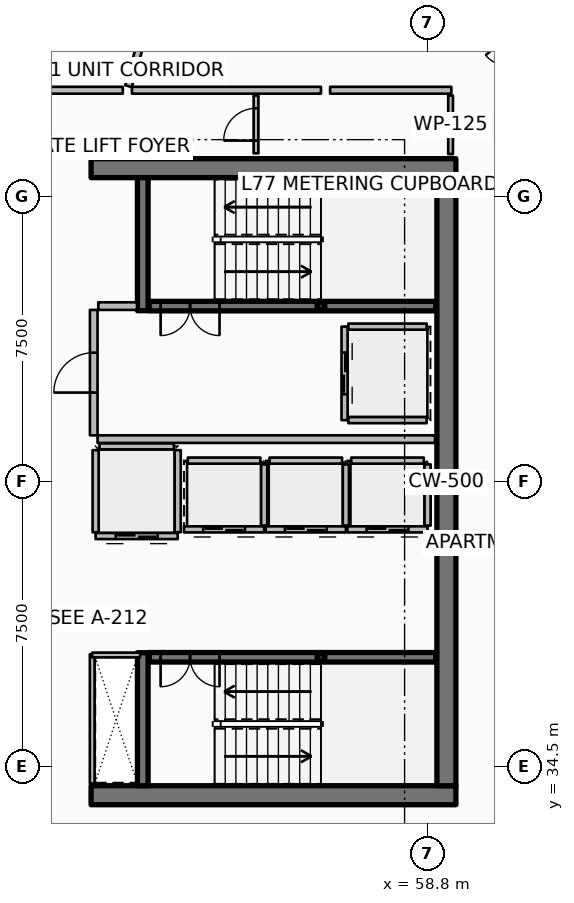
"""IFC4 building model, lengths in metres.
Left out: names, types, materials, properties, quantities, classifications, styles, units other than length and angle.
Written with IfcOpenShell. Run it as: python <this file> out.ifc"""

import sys

from ifc_helpers import new_model, si_unit, direction, frame, frame_2d, origin, origin_2d, place, context, subcontext, project, spatial, rectangle, hollow_rectangle, extrude, element, fill, save


model = new_model("IFC4")
c1 = context("Model", 3, precision=1e-05, world=origin(), true_north=direction((0.0, 1.0)))
c2 = subcontext(c1, "Body", "Model", "MODEL_VIEW")
j1 = project(units=[si_unit("LENGTHUNIT", "METRE"), si_unit("PLANEANGLEUNIT", "RADIAN")], contexts=[c1])
p1 = place(None, origin())
s1 = spatial("IfcSite", under=j1, at=p1, CompositionType="ELEMENT")
p2 = place(p1, origin())
s2 = spatial("IfcBuilding", under=s1, at=p2, CompositionType="ELEMENT")
p3 = place(p2, frame((0.0, 0.0, 306.0)))
s3 = spatial("IfcBuildingStorey", under=s2, at=p3, CompositionType="ELEMENT", Elevation=306.0)
for number, where, z_axis, x_axis in (
    (1, (49.95, 33.75, 0.0), (0.0, 0.0, 1.0), (1.0, 0.0, 0.0)),
    (2, (49.95, 50.25, 0.0), (0.0, 0.0, 1.0), (1.0, 0.0, 0.0)),
):
    element("IfcWall", number, at=place(p3, frame(where, z_axis=z_axis, x_axis=x_axis)), inside=s3, PredefinedType="SHEAR", context=c2, shape_type="SweptSolid", body=[
        extrude(rectangle(XDim=9.6, YDim=0.5, at=frame_2d((4.8, 0.0))), origin(), (0.0, 0.0, 1.0), 3.85),
    ])
p4 = place(p3, frame((59.3, 34.0, 0.0), z_axis=(0.0, 0.0, 1.0), x_axis=(0.0, 1.0, 0.0)))
e3 = element("IfcWall", 3, at=p4, inside=s3, PredefinedType="SHEAR", context=c2, shape_type="SweptSolid", body=[
    extrude(rectangle(XDim=16.0, YDim=0.5, at=frame_2d((8.0, 0.0))), origin(), (0.0, 0.0, 1.0), 3.85),
])
for number, where, z_axis, x_axis in (
    (4, (51.31, 46.5, 0.0), (0.0, 0.0, 1.0), (0.0, 1.0, 0.0)),
    (5, (51.31, 34.0, 0.0), (0.0, 0.0, 1.0), (0.0, 1.0, 0.0)),
):
    element("IfcWall", number, at=place(p3, frame(where, z_axis=z_axis, x_axis=x_axis)), inside=s3, PredefinedType="SHEAR", context=c2, shape_type="SweptSolid", body=[
        extrude(rectangle(XDim=3.5, YDim=0.28, at=frame_2d((1.75, 0.0))), origin(), (0.0, 0.0, 1.0), 3.85),
    ])
for number, where, z_axis, x_axis in (
    (6, (56.0, 46.62, 0.0), (0.0, 0.0, 1.0), (1.0, 0.0, 0.0)),
    (7, (56.0, 37.38, 0.0), (0.0, 0.0, 1.0), (1.0, 0.0, 0.0)),
):
    element("IfcColumn", number, at=place(p3, frame(where, z_axis=z_axis, x_axis=x_axis)), inside=s3, PredefinedType="COLUMN", context=c2, shape_type="SweptSolid", body=[
        extrude(hollow_rectangle(XDim=0.2, YDim=0.2, WallThickness=0.01, InnerFilletRadius=0.01, OuterFilletRadius=0.02, at=origin_2d()), origin(), (0.0, 0.0, 1.0), 1.72),
    ])
p5 = place(p3, frame((51.48, 46.62, 0.0), z_axis=(0.0, 0.0, 1.0), x_axis=(1.0, 0.0, 0.0)))
e8 = element("IfcWall", 8, at=p5, inside=s3, PredefinedType="SOLIDWALL", context=c2, shape_type="SweptSolid", body=[
    extrude(rectangle(XDim=7.54, YDim=0.25, at=frame_2d((3.77, 0.0))), origin(), (0.0, 0.0, 1.0), 3.45),
])
p6 = place(p5, frame((0.3, 0.0, 0.0)))
e9 = element("IfcOpeningElement", 9, at=p6, cuts=e8, PredefinedType="OPENING", context=c2, shape_type="SweptSolid", body=[
    extrude(rectangle(XDim=1.55, YDim=2.15, at=frame_2d((0.775, 1.075))), frame((0.0, 0.135, 0.0), z_axis=(0.0, -1.0, 0.0), x_axis=(1.0, 0.0, 0.0)), (0.0, 0.0, 1.0), 0.27),
])
p7 = place(p3, frame((51.48, 37.38, 0.0), z_axis=(0.0, 0.0, 1.0), x_axis=(1.0, 0.0, 0.0)))
e10 = element("IfcWall", 10, at=p7, inside=s3, PredefinedType="SOLIDWALL", context=c2, shape_type="SweptSolid", body=[
    extrude(rectangle(XDim=7.54, YDim=0.25, at=frame_2d((3.77, 0.0))), origin(), (0.0, 0.0, 1.0), 3.45),
])
p8 = place(p7, frame((0.3, 0.0, 0.0)))
e11 = element("IfcOpeningElement", 11, at=p8, cuts=e10, PredefinedType="OPENING", context=c2, shape_type="SweptSolid", body=[
    extrude(rectangle(XDim=1.55, YDim=2.15, at=frame_2d((0.775, 1.075))), frame((0.0, 0.135, 0.0), z_axis=(0.0, -1.0, 0.0), x_axis=(1.0, 0.0, 0.0)), (0.0, 0.0, 1.0), 0.27),
])
p9 = place(p3, frame((54.505, 40.745, 0.0), z_axis=(0.0, 0.0, 1.0), x_axis=(-1.0, 0.0, 0.0)))
e12 = element("IfcWall", 12, at=p9, inside=s3, PredefinedType="PARTITIONING", context=c2, shape_type="SweptSolid", body=[
    extrude(rectangle(XDim=2.11, YDim=0.16, at=frame_2d((1.055, 0.0))), origin(), (0.0, 0.0, 1.0), 3.45),
])
p10 = place(p9, frame((0.505, 0.0, 0.0)))
e13 = element("IfcOpeningElement", 13, at=p10, cuts=e12, PredefinedType="OPENING", context=c2, shape_type="SweptSolid", body=[
    extrude(rectangle(XDim=1.1, YDim=2.1, at=frame_2d((0.55, 1.05))), frame((0.0, 0.09, 0.0), z_axis=(0.0, -1.0, 0.0), x_axis=(1.0, 0.0, 0.0)), (0.0, 0.0, 1.0), 0.18),
])
p11 = place(p3, frame((54.505, 40.845, 0.0), z_axis=(0.0, 0.0, 1.0), x_axis=(0.0, 1.0, 0.0)))
e14 = element("IfcWall", 14, at=p11, inside=s3, PredefinedType="PARTITIONING", context=c2, shape_type="SweptSolid", body=[
    extrude(rectangle(XDim=1.61, YDim=0.16, at=frame_2d((0.805, 0.0))), origin(), (0.0, 0.0, 1.0), 3.45),
])
p12 = place(p3, frame((52.495, 42.555, 0.0), z_axis=(0.0, 0.0, 1.0), x_axis=(1.0, 0.0, 0.0)))
e15 = element("IfcWall", 15, at=p12, inside=s3, PredefinedType="PARTITIONING", context=c2, shape_type="SweptSolid", body=[
    extrude(rectangle(XDim=1.91, YDim=0.16, at=frame_2d((0.955, 0.0))), origin(), (0.0, 0.0, 1.0), 3.45),
])
p13 = place(p3, frame((56.655, 40.745, 0.0), z_axis=(0.0, 0.0, 1.0), x_axis=(-1.0, 0.0, 0.0)))
e16 = element("IfcWall", 16, at=p13, inside=s3, PredefinedType="PARTITIONING", context=c2, shape_type="SweptSolid", body=[
    extrude(rectangle(XDim=2.11, YDim=0.16, at=frame_2d((1.055, 0.0))), origin(), (0.0, 0.0, 1.0), 3.45),
])
p14 = place(p13, frame((0.505, 0.0, 0.0)))
e17 = element("IfcOpeningElement", 17, at=p14, cuts=e16, PredefinedType="OPENING", context=c2, shape_type="SweptSolid", body=[
    extrude(rectangle(XDim=1.1, YDim=2.1, at=frame_2d((0.55, 1.05))), frame((0.0, 0.09, 0.0), z_axis=(0.0, -1.0, 0.0), x_axis=(1.0, 0.0, 0.0)), (0.0, 0.0, 1.0), 0.18),
])
p15 = place(p3, frame((56.655, 40.845, 0.0), z_axis=(0.0, 0.0, 1.0), x_axis=(0.0, 1.0, 0.0)))
e18 = element("IfcWall", 18, at=p15, inside=s3, PredefinedType="PARTITIONING", context=c2, shape_type="SweptSolid", body=[
    extrude(rectangle(XDim=1.61, YDim=0.16, at=frame_2d((0.805, 0.0))), origin(), (0.0, 0.0, 1.0), 3.45),
])
p16 = place(p3, frame((54.645, 42.555, 0.0), z_axis=(0.0, 0.0, 1.0), x_axis=(1.0, 0.0, 0.0)))
e19 = element("IfcWall", 19, at=p16, inside=s3, PredefinedType="PARTITIONING", context=c2, shape_type="SweptSolid", body=[
    extrude(rectangle(XDim=1.91, YDim=0.16, at=frame_2d((0.955, 0.0))), origin(), (0.0, 0.0, 1.0), 3.45),
])
p17 = place(p3, frame((58.805, 40.745, 0.0), z_axis=(0.0, 0.0, 1.0), x_axis=(-1.0, 0.0, 0.0)))
e20 = element("IfcWall", 20, at=p17, inside=s3, PredefinedType="PARTITIONING", context=c2, shape_type="SweptSolid", body=[
    extrude(rectangle(XDim=2.11, YDim=0.16, at=frame_2d((1.055, 0.0))), origin(), (0.0, 0.0, 1.0), 3.45),
])
p18 = place(p17, frame((0.505, 0.0, 0.0)))
e21 = element("IfcOpeningElement", 21, at=p18, cuts=e20, PredefinedType="OPENING", context=c2, shape_type="SweptSolid", body=[
    extrude(rectangle(XDim=1.1, YDim=2.1, at=frame_2d((0.55, 1.05))), frame((0.0, 0.09, 0.0), z_axis=(0.0, -1.0, 0.0), x_axis=(1.0, 0.0, 0.0)), (0.0, 0.0, 1.0), 0.18),
])
p19 = place(p3, frame((58.805, 40.845, 0.0), z_axis=(0.0, 0.0, 1.0), x_axis=(0.0, 1.0, 0.0)))
e22 = element("IfcWall", 22, at=p19, inside=s3, PredefinedType="PARTITIONING", context=c2, shape_type="SweptSolid", body=[
    extrude(rectangle(XDim=1.61, YDim=0.16, at=frame_2d((0.805, 0.0))), origin(), (0.0, 0.0, 1.0), 3.45),
])
p20 = place(p3, frame((56.795, 42.555, 0.0), z_axis=(0.0, 0.0, 1.0), x_axis=(1.0, 0.0, 0.0)))
e23 = element("IfcWall", 23, at=p20, inside=s3, PredefinedType="PARTITIONING", context=c2, shape_type="SweptSolid", body=[
    extrude(rectangle(XDim=1.91, YDim=0.16, at=frame_2d((0.955, 0.0))), origin(), (0.0, 0.0, 1.0), 3.45),
])
p21 = place(p3, frame((56.62, 46.08, 0.0), z_axis=(0.0, 0.0, 1.0), x_axis=(0.0, -1.0, 0.0)))
e24 = element("IfcWall", 24, at=p21, inside=s3, PredefinedType="PARTITIONING", context=c2, shape_type="SweptSolid", body=[
    extrude(rectangle(XDim=2.46, YDim=0.16, at=frame_2d((1.23, 0.0))), origin(), (0.0, 0.0, 1.0), 3.45),
])
p22 = place(p21, frame((0.68, 0.0, 0.0)))
e25 = element("IfcOpeningElement", 25, at=p22, cuts=e24, PredefinedType="OPENING", context=c2, shape_type="SweptSolid", body=[
    extrude(rectangle(XDim=1.1, YDim=2.1, at=frame_2d((0.55, 1.05))), frame((0.0, 0.09, 0.0), z_axis=(0.0, -1.0, 0.0), x_axis=(1.0, 0.0, 0.0)), (0.0, 0.0, 1.0), 0.18),
])
for number, where, z_axis, x_axis in (
    (26, (56.72, 46.08, 0.0), (0.0, 0.0, 1.0), (1.0, 0.0, 0.0)),
    (27, (56.72, 43.62, 0.0), (0.0, 0.0, 1.0), (1.0, 0.0, 0.0)),
):
    element("IfcWall", number, at=place(p3, frame(where, z_axis=z_axis, x_axis=x_axis)), inside=s3, PredefinedType="PARTITIONING", context=c2, shape_type="SweptSolid", body=[
        extrude(rectangle(XDim=2.06, YDim=0.16, at=frame_2d((1.03, 0.0))), origin(), (0.0, 0.0, 1.0), 3.45),
    ])
p23 = place(p3, frame((52.23, 40.57, 0.0), z_axis=(0.0, 0.0, 1.0), x_axis=(-1.0, 0.0, 0.0)))
e28 = element("IfcWall", 28, at=p23, inside=s3, PredefinedType="PARTITIONING", context=c2, shape_type="SweptSolid", body=[
    extrude(rectangle(XDim=2.16, YDim=0.16, at=frame_2d((1.08, 0.0))), origin(), (0.0, 0.0, 1.0), 3.45),
])
p24 = place(p23, frame((0.53, 0.0, 0.0)))
e29 = element("IfcOpeningElement", 29, at=p24, cuts=e28, PredefinedType="OPENING", context=c2, shape_type="SweptSolid", body=[
    extrude(rectangle(XDim=1.1, YDim=2.1, at=frame_2d((0.55, 1.05))), frame((0.0, 0.09, 0.0), z_axis=(0.0, -1.0, 0.0), x_axis=(1.0, 0.0, 0.0)), (0.0, 0.0, 1.0), 0.18),
])
for number, where, z_axis, x_axis in (
    (30, (52.23, 40.67, 0.0), (0.0, 0.0, 1.0), (0.0, 1.0, 0.0)),
    (31, (50.07, 40.67, 0.0), (0.0, 0.0, 1.0), (0.0, 1.0, 0.0)),
):
    element("IfcWall", number, at=place(p3, frame(where, z_axis=z_axis, x_axis=x_axis)), inside=s3, PredefinedType="PARTITIONING", context=c2, shape_type="SweptSolid", body=[
        extrude(rectangle(XDim=2.16, YDim=0.16, at=frame_2d((1.08, 0.0))), origin(), (0.0, 0.0, 1.0), 3.45),
    ])
p25 = place(p3, frame((50.17, 42.93, 0.0), z_axis=(0.0, 0.0, 1.0), x_axis=(1.0, 0.0, 0.0)))
e32 = element("IfcWall", 32, at=p25, inside=s3, PredefinedType="PARTITIONING", context=c2, shape_type="SweptSolid", body=[
    extrude(rectangle(XDim=1.96, YDim=0.16, at=frame_2d((0.98, 0.0))), origin(), (0.0, 0.0, 1.0), 3.45),
])
p26 = place(p3, frame((50.12, 43.12, 0.0), z_axis=(0.0, 0.0, 1.0), x_axis=(1.0, 0.0, 0.0)))
e33 = element("IfcWall", 33, at=p26, inside=s3, PredefinedType="PARTITIONING", context=c2, shape_type="SweptSolid", body=[
    extrude(rectangle(XDim=8.88, YDim=0.2, at=frame_2d((4.44, 0.0))), origin(), (0.0, 0.0, 1.0), 3.45),
])
p27 = place(p3, frame((50.14, 46.62, 0.0), z_axis=(0.0, 0.0, 1.0), x_axis=(1.0, 0.0, 0.0)))
e34 = element("IfcWall", 34, at=p27, inside=s3, PredefinedType="PARTITIONING", context=c2, shape_type="SweptSolid", body=[
    extrude(rectangle(XDim=1.02, YDim=0.2, at=frame_2d((0.51, 0.0))), origin(), (0.0, 0.0, 1.0), 3.45),
])
p28 = place(p3, frame((50.02, 43.22, 0.0), z_axis=(0.0, 0.0, 1.0), x_axis=(0.0, 1.0, 0.0)))
e35 = element("IfcWall", 35, at=p28, inside=s3, PredefinedType="PARTITIONING", context=c2, shape_type="SweptSolid", body=[
    extrude(rectangle(XDim=3.3, YDim=0.2, at=frame_2d((1.65, 0.0))), origin(), (0.0, 0.0, 1.0), 3.45),
])
p29 = place(p28, frame((1.125, 0.0, 0.0)))
e36 = element("IfcOpeningElement", 36, at=p29, cuts=e35, PredefinedType="OPENING", context=c2, shape_type="SweptSolid", body=[
    extrude(rectangle(XDim=1.05, YDim=2.1, at=frame_2d((0.525, 1.05))), frame((0.0, 0.11, 0.0), z_axis=(0.0, -1.0, 0.0), x_axis=(1.0, 0.0, 0.0)), (0.0, 0.0, 1.0), 0.22),
])
p30 = place(p3, frame((49.98, 34.06, 0.0), z_axis=(0.0, 0.0, 1.0), x_axis=(0.0, 1.0, 0.0)))
e37 = element("IfcWall", 37, at=p30, inside=s3, PredefinedType="PARTITIONING", context=c2, shape_type="SweptSolid", body=[
    extrude(rectangle(XDim=3.4, YDim=0.125, at=frame_2d((1.7, 0.0))), origin(), (0.0, 0.0, 1.0), 2.89),
])
p31 = place(p3, frame((49.98, 37.44, 0.0), z_axis=(0.0, 0.0, 1.0), x_axis=(1.0, 0.0, 0.0)))
e38 = element("IfcWall", 38, at=p31, inside=s3, PredefinedType="PARTITIONING", context=c2, shape_type="SweptSolid", body=[
    extrude(rectangle(XDim=1.26, YDim=0.125, at=frame_2d((0.63, 0.0))), origin(), (0.0, 0.0, 1.0), 2.89),
])
p32 = place(p3, frame((59.41, 50.62, 0.0), z_axis=(0.0, 0.0, 1.0), x_axis=(0.0, 1.0, 0.0)))
e39 = element("IfcWall", 39, at=p32, inside=s3, PredefinedType="PARTITIONING", context=c2, shape_type="SweptSolid", body=[
    extrude(rectangle(XDim=1.54, YDim=0.125, at=frame_2d((0.77, 0.0))), origin(), (0.0, 0.0, 1.0), 2.89),
])
p33 = place(p3, frame((54.29, 50.64, 0.0), z_axis=(0.0, 0.0, 1.0), x_axis=(0.0, 1.0, 0.0)))
e40 = element("IfcWall", 40, at=p33, inside=s3, PredefinedType="PARTITIONING", context=c2, shape_type="SweptSolid", body=[
    extrude(rectangle(XDim=1.52, YDim=0.125, at=frame_2d((0.76, 0.0))), origin(), (0.0, 0.0, 1.0), 2.89),
])
p34 = place(p33, frame((0.335, 0.0, 0.0)))
e41 = element("IfcOpeningElement", 41, at=p34, cuts=e40, PredefinedType="OPENING", context=c2, shape_type="SweptSolid", body=[
    extrude(rectangle(XDim=0.85, YDim=2.06, at=frame_2d((0.425, 1.03))), frame((0.0, 0.073, 0.0), z_axis=(0.0, -1.0, 0.0), x_axis=(1.0, 0.0, 0.0)), (0.0, 0.0, 1.0), 0.145),
])
p35 = place(p3, frame((50.935, 52.406, 0.0), z_axis=(0.0, 0.0, 1.0), x_axis=(0.27143720787, 0.962456150785, 0.0)))
e42 = element("IfcWall", 42, at=p35, inside=s3, PredefinedType="PARTITIONING", context=c2, shape_type="SweptSolid", body=[
    extrude(rectangle(XDim=14.903, YDim=0.18, at=frame_2d((7.451, 0.0))), origin(), (0.0, 0.0, 1.0), 2.407),
])
p36 = place(p3, frame((50.785, 52.3, 0.0), z_axis=(0.0, 0.0, 1.0), x_axis=(-1.0, 0.0, 0.0)))
e43 = element("IfcWall", 43, at=p36, inside=s3, PredefinedType="PARTITIONING", context=c2, shape_type="SweptSolid", body=[
    extrude(rectangle(XDim=3.884, YDim=0.18, at=frame_2d((1.942, 0.0))), origin(), (0.0, 0.0, 1.0), 2.407),
])
p37 = place(p3, frame((59.43, 52.3, 0.0), z_axis=(0.0, 0.0, 1.0), x_axis=(-1.0, 0.0, 0.0)))
e44 = element("IfcWall", 44, at=p37, inside=s3, PredefinedType="PARTITIONING", context=c2, shape_type="SweptSolid", body=[
    extrude(rectangle(XDim=3.19, YDim=0.18, at=frame_2d((1.595, 0.0))), origin(), (0.0, 0.0, 1.0), 2.407),
])
p38 = place(p3, frame((56.0, 52.3, 0.0), z_axis=(0.0, 0.0, 1.0), x_axis=(-1.0, 0.0, 0.0)))
e45 = element("IfcWall", 45, at=p38, inside=s3, PredefinedType="PARTITIONING", context=c2, shape_type="SweptSolid", body=[
    extrude(rectangle(XDim=4.975, YDim=0.18, at=frame_2d((2.488, 0.0))), origin(), (0.0, 0.0, 1.0), 2.407),
])
p39 = place(p6, origin())
e46 = element("IfcDoor", 46, at=p39, inside=s3, OperationType="DOUBLE_DOOR_SINGLE_SWING", PredefinedType="DOOR", context=c2, shape_type="SweptSolid", body=[
    extrude(rectangle(XDim=1.55, YDim=2.15, at=frame_2d((0.775, 1.075))), frame((0.0, 0.025, 0.0), z_axis=(0.0, -1.0, 0.0), x_axis=(1.0, 0.0, 0.0)), (0.0, 0.0, 1.0), 0.05),
])
fill(e9, e46)
p40 = place(p8, origin())
e47 = element("IfcDoor", 47, at=p40, inside=s3, OperationType="DOUBLE_DOOR_SINGLE_SWING", PredefinedType="DOOR", context=c2, shape_type="SweptSolid", body=[
    extrude(rectangle(XDim=1.55, YDim=2.15, at=frame_2d((0.775, 1.075))), frame((0.0, 0.025, 0.0), z_axis=(0.0, -1.0, 0.0), x_axis=(1.0, 0.0, 0.0)), (0.0, 0.0, 1.0), 0.05),
])
fill(e11, e47)
p41 = place(p10, origin())
e48 = element("IfcDoor", 48, at=p41, inside=s3, OperationType="DOUBLE_DOOR_SLIDING", PredefinedType="DOOR", context=c2, shape_type="SweptSolid", body=[
    extrude(rectangle(XDim=1.1, YDim=2.1, at=frame_2d((0.55, 1.05))), frame((0.0, 0.025, 0.0), z_axis=(0.0, -1.0, 0.0), x_axis=(1.0, 0.0, 0.0)), (0.0, 0.0, 1.0), 0.05),
])
fill(e13, e48)
p42 = place(p14, origin())
e49 = element("IfcDoor", 49, at=p42, inside=s3, OperationType="DOUBLE_DOOR_SLIDING", PredefinedType="DOOR", context=c2, shape_type="SweptSolid", body=[
    extrude(rectangle(XDim=1.1, YDim=2.1, at=frame_2d((0.55, 1.05))), frame((0.0, 0.025, 0.0), z_axis=(0.0, -1.0, 0.0), x_axis=(1.0, 0.0, 0.0)), (0.0, 0.0, 1.0), 0.05),
])
fill(e17, e49)
p43 = place(p18, origin())
e50 = element("IfcDoor", 50, at=p43, inside=s3, OperationType="DOUBLE_DOOR_SLIDING", PredefinedType="DOOR", context=c2, shape_type="SweptSolid", body=[
    extrude(rectangle(XDim=1.1, YDim=2.1, at=frame_2d((0.55, 1.05))), frame((0.0, 0.025, 0.0), z_axis=(0.0, -1.0, 0.0), x_axis=(1.0, 0.0, 0.0)), (0.0, 0.0, 1.0), 0.05),
])
fill(e21, e50)
p44 = place(p22, origin())
e51 = element("IfcDoor", 51, at=p44, inside=s3, OperationType="DOUBLE_DOOR_SLIDING", PredefinedType="DOOR", context=c2, shape_type="SweptSolid", body=[
    extrude(rectangle(XDim=1.1, YDim=2.1, at=frame_2d((0.55, 1.05))), frame((0.0, 0.025, 0.0), z_axis=(0.0, -1.0, 0.0), x_axis=(1.0, 0.0, 0.0)), (0.0, 0.0, 1.0), 0.05),
])
fill(e25, e51)
p45 = place(p24, origin())
e52 = element("IfcDoor", 52, at=p45, inside=s3, OperationType="DOUBLE_DOOR_SLIDING", PredefinedType="DOOR", context=c2, shape_type="SweptSolid", body=[
    extrude(rectangle(XDim=1.1, YDim=2.1, at=frame_2d((0.55, 1.05))), frame((0.0, 0.025, 0.0), z_axis=(0.0, -1.0, 0.0), x_axis=(1.0, 0.0, 0.0)), (0.0, 0.0, 1.0), 0.05),
])
fill(e29, e52)
p46 = place(p29, origin())
e53 = element("IfcDoor", 53, at=p46, inside=s3, OperationType="SINGLE_SWING_LEFT", PredefinedType="DOOR", context=c2, shape_type="SweptSolid", body=[
    extrude(rectangle(XDim=1.05, YDim=2.1, at=frame_2d((0.525, 1.05))), frame((0.0, 0.025, 0.0), z_axis=(0.0, -1.0, 0.0), x_axis=(1.0, 0.0, 0.0)), (0.0, 0.0, 1.0), 0.05),
])
fill(e36, e53)
p47 = place(p34, origin())
e54 = element("IfcDoor", 54, at=p47, inside=s3, OperationType="SINGLE_SWING_LEFT", PredefinedType="DOOR", context=c2, shape_type="SweptSolid", body=[
    extrude(rectangle(XDim=0.85, YDim=2.06, at=frame_2d((0.425, 1.03))), frame((0.0, 0.025, 0.0), z_axis=(0.0, -1.0, 0.0), x_axis=(1.0, 0.0, 0.0)), (0.0, 0.0, 1.0), 0.05),
])
fill(e41, e54)
save(model, sys.argv[1])
